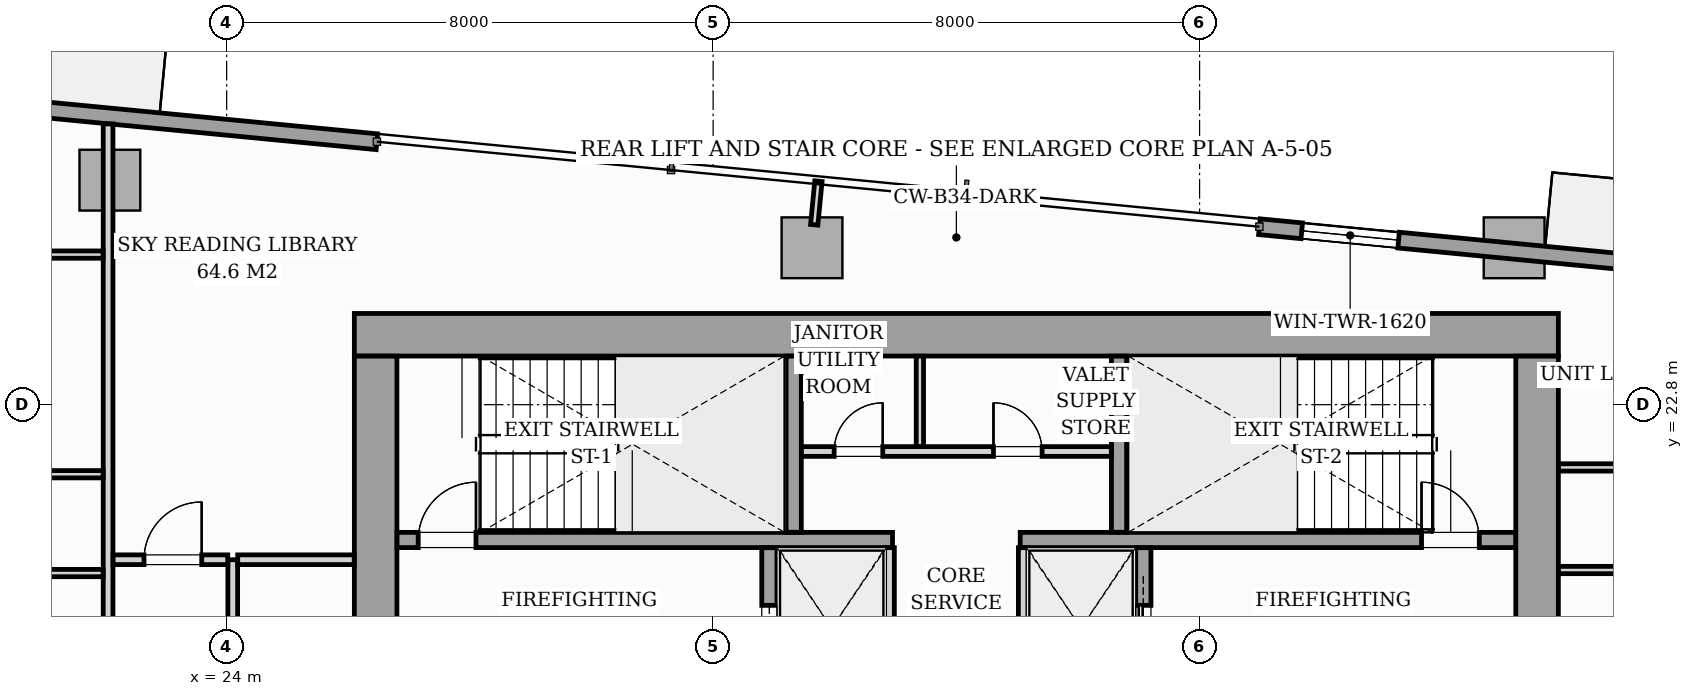
"""IFC4 building model, lengths in metres.
Left out: names, types, materials, properties, quantities, classifications, styles, units other than length and angle.
Written with IfcOpenShell. Run it as: python <this file> out.ifc"""

import sys

from ifc_helpers import new_model, si_unit, direction, frame, frame_2d, origin, origin_2d, place, context, subcontext, project, spatial, rectangle, i_section, extrude, source, transform, mapped, element, fill, save


model = new_model("IFC4")
c1 = context("Model", 3, precision=1e-05, world=origin(), true_north=direction((0.0, 1.0)))
c2 = subcontext(c1, "Body", "Model", "MODEL_VIEW")
j1 = project(units=[si_unit("LENGTHUNIT", "METRE"), si_unit("PLANEANGLEUNIT", "RADIAN")], contexts=[c1])
p1 = place(None, origin())
s1 = spatial("IfcSite", under=j1, at=p1, CompositionType="ELEMENT")
p2 = place(p1, origin())
s2 = spatial("IfcBuilding", under=s1, at=p2, CompositionType="ELEMENT")
p3 = place(p2, frame((0.0, 0.0, 127.8)))
s3 = spatial("IfcBuildingStorey", under=s2, at=p3, CompositionType="ELEMENT", Elevation=127.8)
m1 = source(origin(), c2, "Body", "SweptSolid", [
    extrude(i_section(OverallWidth=0.421, OverallDepth=0.465, WebThickness=0.045, FlangeThickness=0.073, FilletRadius=0.018, at=origin_2d()), origin(), (0.0, 0.0, 1.0), 3.196),
])
for number, where, z_axis, x_axis in (
    (1, (26.4, 24.0, 0.002), (0.0, 0.0, 1.0), (1.0, 0.0, 0.0)),
    (2, (33.12, 24.0, 0.002), (0.0, 0.0, 1.0), (1.0, 0.0, 0.0)),
    (3, (38.88, 24.0, 0.002), (0.0, 0.0, 1.0), (1.0, 0.0, 0.0)),
    (4, (45.6, 24.0, 0.002), (0.0, 0.0, 1.0), (1.0, 0.0, 0.0)),
):
    element("IfcColumn", number, at=place(p3, frame(where, z_axis=z_axis, x_axis=x_axis)), inside=s3, PredefinedType="PILASTER", context=c2, shape_type="MappedRepresentation", body=[
        mapped(m1, transform((0.0, 0.0, 0.0), scale=1.0)),
    ])
m2 = source(origin(), c2, "Body", "SweptSolid", [
    extrude(rectangle(XDim=1.0, YDim=1.0, at=origin_2d()), origin(), (0.0, 0.0, 1.0), 3.196),
])
for number, where, z_axis, x_axis in (
    (5, (22.08, 26.492, 0.002), (0.0, 0.0, 1.0), (0.995, -0.096, 0.0)),
    (6, (33.626, 25.38, 0.002), (0.0, 0.0, 1.0), (0.995, -0.096, 0.0)),
    (7, (45.173, 25.38, 0.002), (0.0, 0.0, 1.0), (0.995, -0.096, 0.0)),
):
    element("IfcColumn", number, at=place(p3, frame(where, z_axis=z_axis, x_axis=x_axis)), inside=s3, PredefinedType="COLUMN", context=c2, shape_type="MappedRepresentation", body=[
        mapped(m2, transform((0.0, 0.0, 0.0), scale=1.0)),
    ])
p4 = place(p3, frame((9.539, 28.754, 0.0), z_axis=(0.0, 0.0, 1.0), x_axis=(0.995397345886, -0.09583383433, 0.0)))
e8 = element("IfcWall", 8, at=p4, inside=s3, PredefinedType="STANDARD", context=c2, shape_type="SweptSolid", body=[
    extrude(rectangle(XDim=17.01, YDim=0.26, at=frame_2d((8.505, 0.0))), origin(), (0.0, 0.0, 1.0), 2.94),
])
p5 = place(p4, frame((6.974, 0.0, 0.0)))
e9 = element("IfcOpeningElement", 9, at=p5, cuts=e8, PredefinedType="OPENING", context=c2, shape_type="SweptSolid", body=[
    extrude(rectangle(XDim=1.8, YDim=2.06, at=frame_2d((0.9, 1.03))), frame((0.0, 0.14, 0.0), z_axis=(0.0, -1.0, 0.0), x_axis=(1.0, 0.0, 0.0)), (0.0, 0.0, 1.0), 0.28),
])
p6 = place(p4, frame((2.05, 0.0, 0.65)))
e10 = element("IfcOpeningElement", 10, at=p6, cuts=e8, PredefinedType="OPENING", context=c2, shape_type="SweptSolid", body=[
    extrude(rectangle(XDim=1.6, YDim=1.5, at=frame_2d((0.8, 0.75))), frame((0.0, 0.14, 0.0), z_axis=(0.0, -1.0, 0.0), x_axis=(1.0, 0.0, 0.0)), (0.0, 0.0, 1.0), 0.28),
])
p7 = place(p3, frame((40.983, 25.727, 0.0), z_axis=(0.0, 0.0, 1.0), x_axis=(0.995395844771, -0.095849424686, 0.0)))
e11 = element("IfcWall", 11, at=p7, inside=s3, PredefinedType="STANDARD", context=c2, shape_type="SweptSolid", body=[
    extrude(rectangle(XDim=17.01, YDim=0.26, at=frame_2d((8.505, 0.0))), origin(), (0.0, 0.0, 1.0), 2.94),
])
p8 = place(p7, frame((9.25, 0.0, 0.0)))
e12 = element("IfcOpeningElement", 12, at=p8, cuts=e11, PredefinedType="OPENING", context=c2, shape_type="SweptSolid", body=[
    extrude(rectangle(XDim=1.8, YDim=2.06, at=frame_2d((0.9, 1.03))), frame((0.0, 0.14, 0.0), z_axis=(0.0, -1.0, 0.0), x_axis=(1.0, 0.0, 0.0)), (0.0, 0.0, 1.0), 0.28),
])
p9 = place(p7, frame((0.7, 0.0, 0.65)))
e13 = element("IfcOpeningElement", 13, at=p9, cuts=e11, PredefinedType="OPENING", context=c2, shape_type="SweptSolid", body=[
    extrude(rectangle(XDim=1.6, YDim=1.5, at=frame_2d((0.8, 0.75))), frame((0.0, 0.14, 0.0), z_axis=(0.0, -1.0, 0.0), x_axis=(1.0, 0.0, 0.0)), (0.0, 0.0, 1.0), 0.28),
])
p10 = place(p3, frame((26.1, 23.95, 0.0), z_axis=(0.0, 0.0, 1.0), x_axis=(1.0, 0.0, 0.0)))
e14 = element("IfcWall", 14, at=p10, inside=s3, PredefinedType="SHEAR", context=c2, shape_type="SweptSolid", body=[
    extrude(rectangle(XDim=19.8, YDim=0.7, at=frame_2d((9.9, 0.0))), origin(), (0.0, 0.0, 1.0), 3.2),
])
for number, where, z_axis, x_axis in (
    (15, (26.45, 17.802, 0.0), (0.0, 0.0, 1.0), (0.0, 1.0, 0.0)),
    (16, (45.55, 17.802, 0.0), (0.0, 0.0, 1.0), (0.0, 1.0, 0.0)),
):
    element("IfcWall", number, at=place(p3, frame(where, z_axis=z_axis, x_axis=x_axis)), inside=s3, PredefinedType="SHEAR", context=c2, shape_type="SweptSolid", body=[
        extrude(rectangle(XDim=5.796, YDim=0.7, at=frame_2d((2.898, 0.0))), origin(), (0.0, 0.0, 1.0), 3.2),
    ])
p11 = place(p3, frame((26.802, 20.575, 0.0), z_axis=(0.0, 0.0, 1.0), x_axis=(1.0, 0.0, 0.0)))
e17 = element("IfcWall", 17, at=p11, inside=s3, PredefinedType="SOLIDWALL", context=c2, shape_type="SweptSolid", body=[
    extrude(rectangle(XDim=8.148, YDim=0.25, at=frame_2d((4.074, 0.0))), origin(), (0.0, 0.0, 1.0), 3.2),
])
p12 = place(p11, frame((0.348, 0.0, 0.0)))
e18 = element("IfcOpeningElement", 18, at=p12, cuts=e17, PredefinedType="OPENING", context=c2, shape_type="SweptSolid", body=[
    extrude(rectangle(XDim=0.95, YDim=2.06, at=frame_2d((0.475, 1.03))), frame((0.0, 0.135, 0.0), z_axis=(0.0, -1.0, 0.0), x_axis=(1.0, 0.0, 0.0)), (0.0, 0.0, 1.0), 0.27),
])
p13 = place(p3, frame((37.05, 20.575, 0.0), z_axis=(0.0, 0.0, 1.0), x_axis=(1.0, 0.0, 0.0)))
e19 = element("IfcWall", 19, at=p13, inside=s3, PredefinedType="SOLIDWALL", context=c2, shape_type="SweptSolid", body=[
    extrude(rectangle(XDim=8.148, YDim=0.25, at=frame_2d((4.074, 0.0))), origin(), (0.0, 0.0, 1.0), 3.2),
])
p14 = place(p13, frame((6.6, 0.0, 0.0)))
e20 = element("IfcOpeningElement", 20, at=p14, cuts=e19, PredefinedType="OPENING", context=c2, shape_type="SweptSolid", body=[
    extrude(rectangle(XDim=0.95, YDim=2.06, at=frame_2d((0.475, 1.03))), frame((0.0, 0.135, 0.0), z_axis=(0.0, -1.0, 0.0), x_axis=(1.0, 0.0, 0.0)), (0.0, 0.0, 1.0), 0.27),
])
for number, where, z_axis, x_axis in (
    (21, (33.325, 20.702, 0.0), (0.0, 0.0, 1.0), (0.0, 1.0, 0.0)),
    (22, (38.675, 20.702, 0.0), (0.0, 0.0, 1.0), (0.0, 1.0, 0.0)),
):
    element("IfcWall", number, at=place(p3, frame(where, z_axis=z_axis, x_axis=x_axis)), inside=s3, PredefinedType="SOLIDWALL", context=c2, shape_type="SweptSolid", body=[
        extrude(rectangle(XDim=2.896, YDim=0.25, at=frame_2d((1.448, 0.0))), origin(), (0.0, 0.0, 1.0), 3.2),
    ])
p15 = place(p3, frame((32.925, 17.802, 0.0), z_axis=(0.0, 0.0, 1.0), x_axis=(0.0, 1.0, 0.0)))
e23 = element("IfcWall", 23, at=p15, inside=s3, PredefinedType="SOLIDWALL", context=c2, shape_type="SweptSolid", body=[
    extrude(rectangle(XDim=2.646, YDim=0.25, at=frame_2d((1.323, 0.0))), origin(), (0.0, 0.0, 1.0), 3.2),
])
p16 = place(p15, frame((0.598, 0.0, 0.0)))
e24 = element("IfcOpeningElement", 24, at=p16, cuts=e23, PredefinedType="OPENING", context=c2, shape_type="SweptSolid", body=[
    extrude(rectangle(XDim=1.1, YDim=2.08, at=frame_2d((0.55, 1.04))), frame((0.0, 0.135, 0.0), z_axis=(0.0, -1.0, 0.0), x_axis=(1.0, 0.0, 0.0)), (0.0, 0.0, 1.0), 0.27),
])
for number, where, z_axis, x_axis in (
    (25, (34.9, 17.802, 0.0), (0.0, 0.0, 1.0), (0.0, 1.0, 0.0)),
    (26, (37.1, 17.802, 0.0), (0.0, 0.0, 1.0), (0.0, 1.0, 0.0)),
):
    element("IfcWall", number, at=place(p3, frame(where, z_axis=z_axis, x_axis=x_axis)), inside=s3, PredefinedType="PARTITIONING", context=c2, shape_type="SweptSolid", body=[
        extrude(rectangle(XDim=2.646, YDim=0.16, at=frame_2d((1.323, 0.0))), origin(), (0.0, 0.0, 1.0), 2.94),
    ])
p17 = place(p3, frame((39.075, 17.802, 0.0), z_axis=(0.0, 0.0, 1.0), x_axis=(0.0, 1.0, 0.0)))
e27 = element("IfcWall", 27, at=p17, inside=s3, PredefinedType="SOLIDWALL", context=c2, shape_type="SweptSolid", body=[
    extrude(rectangle(XDim=2.646, YDim=0.25, at=frame_2d((1.323, 0.0))), origin(), (0.0, 0.0, 1.0), 3.2),
])
p18 = place(p17, frame((0.598, 0.0, 0.0)))
e28 = element("IfcOpeningElement", 28, at=p18, cuts=e27, PredefinedType="OPENING", context=c2, shape_type="SweptSolid", body=[
    extrude(rectangle(XDim=1.1, YDim=2.08, at=frame_2d((0.55, 1.04))), frame((0.0, 0.135, 0.0), z_axis=(0.0, -1.0, 0.0), x_axis=(1.0, 0.0, 0.0)), (0.0, 0.0, 1.0), 0.27),
])
p19 = place(p3, frame((33.452, 22.03, 0.0), z_axis=(0.0, 0.0, 1.0), x_axis=(1.0, 0.0, 0.0)))
e29 = element("IfcWall", 29, at=p19, inside=s3, PredefinedType="PARTITIONING", context=c2, shape_type="SweptSolid", body=[
    extrude(rectangle(XDim=5.096, YDim=0.16, at=frame_2d((2.548, 0.0))), origin(), (0.0, 0.0, 1.0), 2.94),
])
p20 = place(p19, frame((0.538, 0.0, 0.0)))
e30 = element("IfcOpeningElement", 30, at=p20, cuts=e29, PredefinedType="OPENING", context=c2, shape_type="SweptSolid", body=[
    extrude(rectangle(XDim=0.8, YDim=2.05, at=frame_2d((0.4, 1.025))), frame((0.0, 0.09, 0.0), z_axis=(0.0, -1.0, 0.0), x_axis=(1.0, 0.0, 0.0)), (0.0, 0.0, 1.0), 0.18),
])
p21 = place(p19, frame((3.158, 0.0, 0.0)))
e31 = element("IfcOpeningElement", 31, at=p21, cuts=e29, PredefinedType="OPENING", context=c2, shape_type="SweptSolid", body=[
    extrude(rectangle(XDim=0.8, YDim=2.05, at=frame_2d((0.4, 1.025))), frame((0.0, 0.09, 0.0), z_axis=(0.0, -1.0, 0.0), x_axis=(1.0, 0.0, 0.0)), (0.0, 0.0, 1.0), 0.18),
])
p22 = place(p3, frame((35.4, 22.112, 0.0), z_axis=(0.0, 0.0, 1.0), x_axis=(0.0, 1.0, 0.0)))
e32 = element("IfcWall", 32, at=p22, inside=s3, PredefinedType="PARTITIONING", context=c2, shape_type="SweptSolid", body=[
    extrude(rectangle(XDim=1.486, YDim=0.12, at=frame_2d((0.743, 0.0))), origin(), (0.0, 0.0, 1.0), 2.94),
])
p23 = place(p3, frame((22.05, 12.632, 0.0), z_axis=(0.0, 0.0, 1.0), x_axis=(0.0, 1.0, 0.0)))
e33 = element("IfcWall", 33, at=p23, inside=s3, PredefinedType="PARTITIONING", context=c2, shape_type="SweptSolid", body=[
    extrude(rectangle(XDim=14.785, YDim=0.16, at=frame_2d((7.393, 0.0))), origin(), (0.0, 0.0, 1.0), 2.94),
])
p24 = place(p23, frame((0.493, 0.0, 0.0)))
e34 = element("IfcOpeningElement", 34, at=p24, cuts=e33, PredefinedType="OPENING", context=c2, shape_type="SweptSolid", body=[
    extrude(rectangle(XDim=0.95, YDim=2.06, at=frame_2d((0.475, 1.03))), frame((0.0, 0.09, 0.0), z_axis=(0.0, -1.0, 0.0), x_axis=(1.0, 0.0, 0.0)), (0.0, 0.0, 1.0), 0.18),
])
p25 = place(p3, frame((14.426, 25.268, 0.0), z_axis=(0.0, 0.0, 1.0), x_axis=(1.0, 0.0, 0.0)))
e35 = element("IfcWall", 35, at=p25, inside=s3, PredefinedType="PARTITIONING", context=c2, shape_type="SweptSolid", body=[
    extrude(rectangle(XDim=7.542, YDim=0.12, at=frame_2d((3.771, 0.0))), origin(), (0.0, 0.0, 1.0), 2.94),
])
p26 = place(p25, frame((3.316, 0.0, 0.0)))
e36 = element("IfcOpeningElement", 36, at=p26, cuts=e35, PredefinedType="OPENING", context=c2, shape_type="SweptSolid", body=[
    extrude(rectangle(XDim=0.85, YDim=2.05, at=frame_2d((0.425, 1.025))), frame((0.0, 0.07, 0.0), z_axis=(0.0, -1.0, 0.0), x_axis=(1.0, 0.0, 0.0)), (0.0, 0.0, 1.0), 0.14),
])
p27 = place(p3, frame((6.424, 21.656, 0.0), z_axis=(0.0, 0.0, 1.0), x_axis=(1.0, 0.0, 0.0)))
e37 = element("IfcWall", 37, at=p27, inside=s3, PredefinedType="PARTITIONING", context=c2, shape_type="SweptSolid", body=[
    extrude(rectangle(XDim=15.544, YDim=0.12, at=frame_2d((7.772, 0.0))), origin(), (0.0, 0.0, 1.0), 2.94),
])
p28 = place(p27, frame((9.422, 0.0, 0.0)))
e38 = element("IfcOpeningElement", 38, at=p28, cuts=e37, PredefinedType="OPENING", context=c2, shape_type="SweptSolid", body=[
    extrude(rectangle(XDim=0.85, YDim=2.05, at=frame_2d((0.425, 1.025))), frame((0.0, 0.07, 0.0), z_axis=(0.0, -1.0, 0.0), x_axis=(1.0, 0.0, 0.0)), (0.0, 0.0, 1.0), 0.14),
])
p29 = place(p3, frame((6.268, 20.031, 0.0), z_axis=(0.0, 0.0, 1.0), x_axis=(1.0, 0.0, 0.0)))
e39 = element("IfcWall", 39, at=p29, inside=s3, PredefinedType="PARTITIONING", context=c2, shape_type="SweptSolid", body=[
    extrude(rectangle(XDim=15.7, YDim=0.12, at=frame_2d((7.85, 0.0))), origin(), (0.0, 0.0, 1.0), 2.94),
])
p30 = place(p29, frame((9.579, 0.0, 0.0)))
e40 = element("IfcOpeningElement", 40, at=p30, cuts=e39, PredefinedType="OPENING", context=c2, shape_type="SweptSolid", body=[
    extrude(rectangle(XDim=0.85, YDim=2.05, at=frame_2d((0.425, 1.025))), frame((0.0, 0.07, 0.0), z_axis=(0.0, -1.0, 0.0), x_axis=(1.0, 0.0, 0.0)), (0.0, 0.0, 1.0), 0.14),
])
p31 = place(p3, frame((45.902, 21.768, 0.0), z_axis=(0.0, 0.0, 1.0), x_axis=(1.0, 0.0, 0.0)))
e41 = element("IfcWall", 41, at=p31, inside=s3, PredefinedType="PARTITIONING", context=c2, shape_type="SweptSolid", body=[
    extrude(rectangle(XDim=12.781, YDim=0.12, at=frame_2d((6.391, 0.0))), origin(), (0.0, 0.0, 1.0), 2.94),
])
p32 = place(p31, frame((6.146, 0.0, 0.0)))
e42 = element("IfcOpeningElement", 42, at=p32, cuts=e41, PredefinedType="OPENING", context=c2, shape_type="SweptSolid", body=[
    extrude(rectangle(XDim=0.85, YDim=2.05, at=frame_2d((0.425, 1.025))), frame((0.0, 0.07, 0.0), z_axis=(0.0, -1.0, 0.0), x_axis=(1.0, 0.0, 0.0)), (0.0, 0.0, 1.0), 0.14),
])
p33 = place(p3, frame((45.902, 20.081, 0.0), z_axis=(0.0, 0.0, 1.0), x_axis=(1.0, 0.0, 0.0)))
e43 = element("IfcWall", 43, at=p33, inside=s3, PredefinedType="PARTITIONING", context=c2, shape_type="SweptSolid", body=[
    extrude(rectangle(XDim=14.057, YDim=0.12, at=frame_2d((7.029, 0.0))), origin(), (0.0, 0.0, 1.0), 2.94),
])
p34 = place(p33, frame((6.708, 0.0, 0.0)))
e44 = element("IfcOpeningElement", 44, at=p34, cuts=e43, PredefinedType="OPENING", context=c2, shape_type="SweptSolid", body=[
    extrude(rectangle(XDim=0.85, YDim=2.05, at=frame_2d((0.425, 1.025))), frame((0.0, 0.07, 0.0), z_axis=(0.0, -1.0, 0.0), x_axis=(1.0, 0.0, 0.0)), (0.0, 0.0, 1.0), 0.14),
])
p35 = place(p3, frame((24.1, 14.66, 0.0), z_axis=(0.0, 0.0, 1.0), x_axis=(0.0, 1.0, 0.0)))
e45 = element("IfcWall", 45, at=p35, inside=s3, PredefinedType="PARTITIONING", context=c2, shape_type="SweptSolid", body=[
    extrude(rectangle(XDim=5.59, YDim=0.16, at=frame_2d((2.795, 0.0))), origin(), (0.0, 0.0, 1.0), 2.94),
])
p36 = place(p35, frame((2.36, 0.0, 0.0)))
e46 = element("IfcOpeningElement", 46, at=p36, cuts=e45, PredefinedType="OPENING", context=c2, shape_type="SweptSolid", body=[
    extrude(rectangle(XDim=0.85, YDim=2.0, at=frame_2d((0.425, 1.0))), frame((0.0, 0.09, 0.0), z_axis=(0.0, -1.0, 0.0), x_axis=(1.0, 0.0, 0.0)), (0.0, 0.0, 1.0), 0.18),
])
p37 = place(p3, frame((22.132, 20.25, 0.0), z_axis=(0.0, 0.0, 1.0), x_axis=(1.0, 0.0, 0.0)))
e47 = element("IfcWall", 47, at=p37, inside=s3, PredefinedType="PARTITIONING", context=c2, shape_type="SweptSolid", body=[
    extrude(rectangle(XDim=1.886, YDim=0.16, at=frame_2d((0.943, 0.0))), origin(), (0.0, 0.0, 1.0), 2.94),
])
p38 = place(p37, frame((0.508, 0.0, 0.0)))
e48 = element("IfcOpeningElement", 48, at=p38, cuts=e47, PredefinedType="OPENING", context=c2, shape_type="SweptSolid", body=[
    extrude(rectangle(XDim=0.95, YDim=2.06, at=frame_2d((0.475, 1.03))), frame((0.0, 0.09, 0.0), z_axis=(0.0, -1.0, 0.0), x_axis=(1.0, 0.0, 0.0)), (0.0, 0.0, 1.0), 0.18),
])
p39 = place(p3, frame((24.182, 20.25, 0.0), z_axis=(0.0, 0.0, 1.0), x_axis=(1.0, 0.0, 0.0)))
e49 = element("IfcWall", 49, at=p39, inside=s3, PredefinedType="PARTITIONING", context=c2, shape_type="SweptSolid", body=[
    extrude(rectangle(XDim=1.916, YDim=0.16, at=frame_2d((0.958, 0.0))), origin(), (0.0, 0.0, 1.0), 2.94),
])
p40 = place(p3, frame((33.663, 25.759, 0.0), z_axis=(0.0, 0.0, 1.0), x_axis=(0.095977354523, 0.995383517755, 0.0)))
e50 = element("IfcWall", 50, at=p40, inside=s3, PredefinedType="PARTITIONING", context=c2, shape_type="SweptSolid", body=[
    extrude(rectangle(XDim=0.72, YDim=0.12, at=frame_2d((0.36, 0.0))), origin(), (0.0, 0.0, 1.0), 2.94),
])
m3 = source(origin(), c2, "Body", "SweptSolid", [
    extrude(rectangle(XDim=1.6, YDim=1.5, at=frame_2d((0.8, 0.75))), frame((0.0, 0.03, 0.0), z_axis=(0.0, -1.0, 0.0), x_axis=(1.0, 0.0, 0.0)), (0.0, 0.0, 1.0), 0.06),
])
p41 = place(p9, origin())
e51 = element("IfcWindow", 51, at=p41, inside=s3, PartitioningType="SINGLE_PANEL", PredefinedType="WINDOW", context=c2, shape_type="MappedRepresentation", body=[
    mapped(m3, transform((0.0, 0.0, 0.0), scale=1.0)),
])
fill(e13, e51)
m4 = source(origin(), c2, "Body", "SweptSolid", [
    extrude(rectangle(XDim=0.95, YDim=2.06, at=frame_2d((0.475, 1.03))), frame((0.0, 0.025, 0.0), z_axis=(0.0, -1.0, 0.0), x_axis=(1.0, 0.0, 0.0)), (0.0, 0.0, 1.0), 0.05),
])
p42 = place(p12, origin())
e52 = element("IfcDoor", 52, at=p42, inside=s3, OperationType="SINGLE_SWING_RIGHT", PredefinedType="DOOR", context=c2, shape_type="MappedRepresentation", body=[
    mapped(m4, transform((0.0, 0.0, 0.0), scale=1.0)),
])
fill(e18, e52)
p43 = place(p14, origin())
e53 = element("IfcDoor", 53, at=p43, inside=s3, OperationType="SINGLE_SWING_LEFT", PredefinedType="DOOR", context=c2, shape_type="MappedRepresentation", body=[
    mapped(m4, transform((0.0, 0.0, 0.0), scale=1.0)),
])
fill(e20, e53)
m5 = source(origin(), c2, "Body", "SweptSolid", [
    extrude(rectangle(XDim=1.1, YDim=2.08, at=frame_2d((0.55, 1.04))), frame((0.0, 0.025, 0.0), z_axis=(0.0, -1.0, 0.0), x_axis=(1.0, 0.0, 0.0)), (0.0, 0.0, 1.0), 0.05),
])
p44 = place(p16, origin())
e54 = element("IfcDoor", 54, at=p44, inside=s3, OperationType="SLIDING_TO_LEFT", PredefinedType="DOOR", context=c2, shape_type="MappedRepresentation", body=[
    mapped(m5, transform((0.0, 0.0, 0.0), scale=1.0)),
])
fill(e24, e54)
p45 = place(p18, origin())
e55 = element("IfcDoor", 55, at=p45, inside=s3, OperationType="SLIDING_TO_RIGHT", PredefinedType="DOOR", context=c2, shape_type="MappedRepresentation", body=[
    mapped(m5, transform((0.0, 0.0, 0.0), scale=1.0)),
])
fill(e28, e55)
m6 = source(origin(), c2, "Body", "SweptSolid", [
    extrude(rectangle(XDim=0.8, YDim=2.05, at=frame_2d((0.4, 1.025))), frame((0.0, 0.025, 0.0), z_axis=(0.0, -1.0, 0.0), x_axis=(1.0, 0.0, 0.0)), (0.0, 0.0, 1.0), 0.05),
])
p46 = place(p20, origin())
e56 = element("IfcDoor", 56, at=p46, inside=s3, OperationType="SINGLE_SWING_RIGHT", PredefinedType="DOOR", context=c2, shape_type="MappedRepresentation", body=[
    mapped(m6, transform((0.0, 0.0, 0.0), scale=1.0)),
])
fill(e30, e56)
p47 = place(p21, origin())
e57 = element("IfcDoor", 57, at=p47, inside=s3, OperationType="SINGLE_SWING_LEFT", PredefinedType="DOOR", context=c2, shape_type="MappedRepresentation", body=[
    mapped(m6, transform((0.0, 0.0, 0.0), scale=1.0)),
])
fill(e31, e57)
m7 = source(origin(), c2, "Body", "SweptSolid", [
    extrude(rectangle(XDim=0.95, YDim=2.06, at=frame_2d((0.475, 1.03))), frame((0.0, 0.025, 0.0), z_axis=(0.0, -1.0, 0.0), x_axis=(1.0, 0.0, 0.0)), (0.0, 0.0, 1.0), 0.05),
])
p48 = place(p38, origin())
e58 = element("IfcDoor", 58, at=p48, inside=s3, OperationType="SINGLE_SWING_RIGHT", PredefinedType="DOOR", context=c2, shape_type="MappedRepresentation", body=[
    mapped(m7, transform((0.0, 0.0, 0.0), scale=1.0)),
])
fill(e48, e58)
save(model, sys.argv[1])
